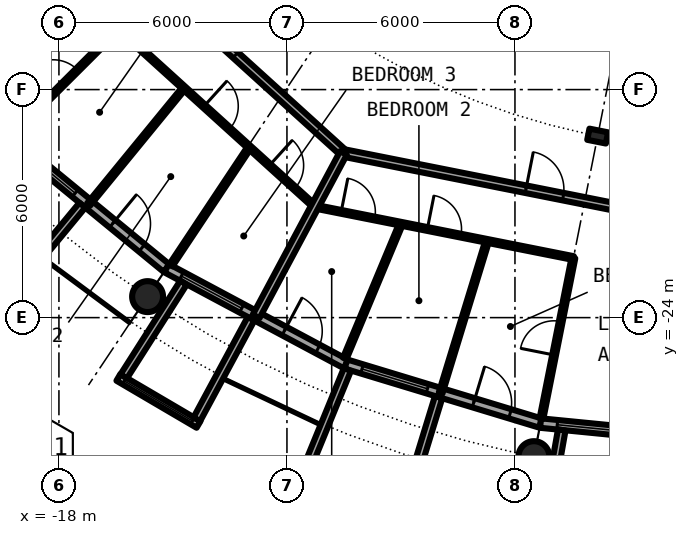
"""IFC4 building model, lengths in metres.
Left out: names, types, materials, properties, quantities, classifications, styles, units other than length and angle.
Written with IfcOpenShell. Run it as: python <this file> out.ifc"""

import sys

from ifc_helpers import new_model, si_unit, direction, frame, frame_2d, origin, origin_2d, place, context, subcontext, project, spatial, rectangle, circle, hollow_circle, i_section, extrude, element, fill, save


model = new_model("IFC4")
c1 = context("Model", 3, precision=1e-05, world=origin(), true_north=direction((0.0, 1.0)))
c2 = subcontext(c1, "Body", "Model", "MODEL_VIEW")
j1 = project(units=[si_unit("LENGTHUNIT", "METRE"), si_unit("PLANEANGLEUNIT", "RADIAN")], contexts=[c1])
p1 = place(None, origin())
s1 = spatial("IfcSite", under=j1, at=p1, CompositionType="ELEMENT")
p2 = place(p1, origin())
s2 = spatial("IfcBuilding", under=s1, at=p2, CompositionType="ELEMENT")
p3 = place(p2, frame((0.0, 0.0, 145.2)))
s3 = spatial("IfcBuildingStorey", under=s2, at=p3, CompositionType="ELEMENT", Elevation=145.2)
for number, where, z_axis, x_axis in (
    (1, (-15.667, -23.448, 0.0), (0.0, 0.0, 1.0), (1.0, 0.0, 0.0)),
    (2, (-5.501, -27.658, 0.0), (0.0, 0.0, 1.0), (1.0, 0.0, 0.0)),
):
    element("IfcColumn", number, at=place(p3, frame(where, z_axis=z_axis, x_axis=x_axis)), inside=s3, PredefinedType="COLUMN", context=c2, shape_type="SweptSolid", body=[
        extrude(hollow_circle(Radius=0.406, WallThickness=0.04, at=origin_2d()), origin(), (0.0, 0.0, 1.0), 3.05),
    ])
p4 = place(p3, frame((-3.824, -19.223, 0.0), z_axis=(0.0, 0.0, 1.0), x_axis=(-0.195090322016, -0.980785280403, 0.0)))
e3 = element("IfcColumn", 3, at=p4, inside=s3, PredefinedType="COLUMN", context=c2, shape_type="SweptSolid", body=[
    extrude(i_section(OverallWidth=0.3, OverallDepth=0.5, WebThickness=0.014, FlangeThickness=0.028, FilletRadius=0.027, at=origin_2d()), origin(), (0.0, 0.0, 1.0), 3.05),
])
p5 = place(p3, frame((-19.304, -19.304, 0.0), z_axis=(0.0, 0.0, 1.0), x_axis=(0.773019449054, -0.634382322723, 0.0)))
e4 = element("IfcWall", 4, at=p5, inside=s3, PredefinedType="SOLIDWALL", context=c2, shape_type="SweptSolid", body=[
    extrude(rectangle(XDim=5.352, YDim=0.25, at=frame_2d((2.676, 0.0))), origin(), (0.0, 0.0, 1.0), 2.7),
])
p6 = place(p5, frame((0.441, 0.0, 0.3)))
e5 = element("IfcOpeningElement", 5, at=p6, cuts=e4, PredefinedType="OPENING", context=c2, shape_type="SweptSolid", body=[
    extrude(rectangle(XDim=1.8, YDim=2.1, at=frame_2d((0.9, 1.05))), frame((0.0, 0.135, 0.0), z_axis=(0.0, -1.0, 0.0), x_axis=(1.0, 0.0, 0.0)), (0.0, 0.0, 1.0), 0.27),
])
p7 = place(p5, frame((3.51, 0.0, 0.0)))
e6 = element("IfcOpeningElement", 6, at=p7, cuts=e4, PredefinedType="OPENING", context=c2, shape_type="SweptSolid", body=[
    extrude(rectangle(XDim=1.0, YDim=2.2, at=frame_2d((0.5, 1.1))), frame((0.0, 0.135, 0.0), z_axis=(0.0, -1.0, 0.0), x_axis=(1.0, 0.0, 0.0)), (0.0, 0.0, 1.0), 0.27),
])
p8 = place(p3, frame((-17.384, -21.041, -0.03), z_axis=(0.0, 0.0, 1.0), x_axis=(-0.63709551667, -0.770784861449, 0.0)))
e7 = element("IfcWall", 7, at=p8, inside=s3, PredefinedType="SOLIDWALL", context=c2, shape_type="SweptSolid", body=[
    extrude(rectangle(XDim=3.006, YDim=0.2, at=frame_2d((1.503, 0.0))), origin(), (0.0, 0.0, 1.0), 2.73),
])
p9 = place(p3, frame((-15.167, -22.699, 0.0), z_axis=(0.0, 0.0, 1.0), x_axis=(0.881915646801, -0.471407246368, 0.0)))
e8 = element("IfcWall", 8, at=p9, inside=s3, PredefinedType="SOLIDWALL", context=c2, shape_type="SweptSolid", body=[
    extrude(rectangle(XDim=5.352, YDim=0.25, at=frame_2d((2.676, 0.0))), origin(), (0.0, 0.0, 1.0), 2.7),
])
p10 = place(p9, frame((0.441, 0.0, 0.3)))
e9 = element("IfcOpeningElement", 9, at=p10, cuts=e8, PredefinedType="OPENING", context=c2, shape_type="SweptSolid", body=[
    extrude(rectangle(XDim=1.8, YDim=2.1, at=frame_2d((0.9, 1.05))), frame((0.0, 0.135, 0.0), z_axis=(0.0, -1.0, 0.0), x_axis=(1.0, 0.0, 0.0)), (0.0, 0.0, 1.0), 0.27),
])
p11 = place(p9, frame((3.51, 0.0, 0.0)))
e10 = element("IfcOpeningElement", 10, at=p11, cuts=e8, PredefinedType="OPENING", context=c2, shape_type="SweptSolid", body=[
    extrude(rectangle(XDim=1.0, YDim=2.2, at=frame_2d((0.5, 1.1))), frame((0.0, 0.135, 0.0), z_axis=(0.0, -1.0, 0.0), x_axis=(1.0, 0.0, 0.0)), (0.0, 0.0, 1.0), 0.27),
])
p12 = place(p3, frame((-16.436, -25.574, -0.03), z_axis=(0.0, 0.0, 1.0), x_axis=(0.862403467503, -0.506221551535, 0.0)))
e11 = element("IfcWall", 11, at=p12, inside=s3, PredefinedType="SOLIDWALL", context=c2, shape_type="SweptSolid", body=[
    extrude(rectangle(XDim=2.446, YDim=0.2, at=frame_2d((1.223, 0.0))), origin(), (0.0, 0.0, 1.0), 2.73),
])
p13 = place(p12, frame((0.183, 0.0, 0.33)))
e12 = element("IfcOpeningElement", 12, at=p13, cuts=e11, PredefinedType="OPENING", context=c2, shape_type="SweptSolid", body=[
    extrude(circle(Radius=1.04, at=frame_2d((1.04, 1.04))), frame((0.0, 0.11, 0.0), z_axis=(0.0, -1.0, 0.0), x_axis=(1.0, 0.0, 0.0)), (0.0, 0.0, 1.0), 0.22),
])
p14 = place(p3, frame((-14.722, -23.079, -0.03), z_axis=(0.0, 0.0, 1.0), x_axis=(-0.537572179146, -0.843217737129, 0.0)))
e13 = element("IfcWall", 13, at=p14, inside=s3, PredefinedType="SOLIDWALL", context=c2, shape_type="SweptSolid", body=[
    extrude(rectangle(XDim=2.924, YDim=0.2, at=frame_2d((1.462, 0.0))), origin(), (0.0, 0.0, 1.0), 2.73),
])
p15 = place(p3, frame((-12.945, -24.029, -0.03), z_axis=(0.0, 0.0, 1.0), x_axis=(-0.474424310775, -0.88029629861, 0.0)))
e14 = element("IfcWall", 14, at=p15, inside=s3, PredefinedType="SOLIDWALL", context=c2, shape_type="SweptSolid", body=[
    extrude(rectangle(XDim=3.006, YDim=0.2, at=frame_2d((1.503, 0.0))), origin(), (0.0, 0.0, 1.0), 2.73),
])
p16 = place(p3, frame((-10.447, -25.222, 0.0), z_axis=(0.0, 0.0, 1.0), x_axis=(0.956965678721, -0.290201119486, 0.0)))
e15 = element("IfcWall", 15, at=p16, inside=s3, PredefinedType="SOLIDWALL", context=c2, shape_type="SweptSolid", body=[
    extrude(rectangle(XDim=5.351, YDim=0.25, at=frame_2d((2.676, 0.0))), origin(), (0.0, 0.0, 1.0), 2.7),
])
p17 = place(p16, frame((0.441, 0.0, 0.3)))
e16 = element("IfcOpeningElement", 16, at=p17, cuts=e15, PredefinedType="OPENING", context=c2, shape_type="SweptSolid", body=[
    extrude(rectangle(XDim=1.8, YDim=2.1, at=frame_2d((0.9, 1.05))), frame((0.0, 0.135, 0.0), z_axis=(0.0, -1.0, 0.0), x_axis=(1.0, 0.0, 0.0)), (0.0, 0.0, 1.0), 0.27),
])
p18 = place(p16, frame((3.51, 0.0, 0.0)))
e17 = element("IfcOpeningElement", 17, at=p18, cuts=e15, PredefinedType="OPENING", context=c2, shape_type="SweptSolid", body=[
    extrude(rectangle(XDim=1.0, YDim=2.2, at=frame_2d((0.5, 1.1))), frame((0.0, 0.135, 0.0), z_axis=(0.0, -1.0, 0.0), x_axis=(1.0, 0.0, 0.0)), (0.0, 0.0, 1.0), 0.27),
])
p19 = place(p3, frame((-10.409, -25.364, -0.03), z_axis=(0.0, 0.0, 1.0), x_axis=(-0.379509886562, -0.925187681501, 0.0)))
e18 = element("IfcWall", 18, at=p19, inside=s3, PredefinedType="SOLIDWALL", context=c2, shape_type="SweptSolid", body=[
    extrude(rectangle(XDim=2.883, YDim=0.2, at=frame_2d((1.441, 0.0))), origin(), (0.0, 0.0, 1.0), 2.73),
])
p20 = place(p3, frame((-8.009, -26.092, -0.03), z_axis=(0.0, 0.0, 1.0), x_axis=(-0.293406695073, -0.955987715029, 0.0)))
e19 = element("IfcWall", 19, at=p20, inside=s3, PredefinedType="SOLIDWALL", context=c2, shape_type="SweptSolid", body=[
    extrude(rectangle(XDim=3.006, YDim=0.2, at=frame_2d((1.503, 0.0))), origin(), (0.0, 0.0, 1.0), 2.73),
])
p21 = place(p3, frame((-5.326, -26.775, 0.0), z_axis=(0.0, 0.0, 1.0), x_axis=(0.995173996315, -0.098126026407, 0.0)))
e20 = element("IfcWall", 20, at=p21, inside=s3, PredefinedType="SOLIDWALL", context=c2, shape_type="SweptSolid", body=[
    extrude(rectangle(XDim=5.352, YDim=0.25, at=frame_2d((2.676, 0.0))), origin(), (0.0, 0.0, 1.0), 2.7),
])
p22 = place(p21, frame((0.441, 0.0, 0.3)))
e21 = element("IfcOpeningElement", 21, at=p22, cuts=e20, PredefinedType="OPENING", context=c2, shape_type="SweptSolid", body=[
    extrude(rectangle(XDim=1.8, YDim=2.1, at=frame_2d((0.9, 1.05))), frame((0.0, 0.135, 0.0), z_axis=(0.0, -1.0, 0.0), x_axis=(1.0, 0.0, 0.0)), (0.0, 0.0, 1.0), 0.27),
])
p23 = place(p21, frame((3.51, 0.0, 0.0)))
e22 = element("IfcOpeningElement", 22, at=p23, cuts=e20, PredefinedType="OPENING", context=c2, shape_type="SweptSolid", body=[
    extrude(rectangle(XDim=1.0, YDim=2.2, at=frame_2d((0.5, 1.1))), frame((0.0, 0.135, 0.0), z_axis=(0.0, -1.0, 0.0), x_axis=(1.0, 0.0, 0.0)), (0.0, 0.0, 1.0), 0.27),
])
p24 = place(p3, frame((-4.769, -26.956, -0.03), z_axis=(0.0, 0.0, 1.0), x_axis=(-0.174056778901, -0.984735618183, 0.0)))
e23 = element("IfcWall", 23, at=p24, inside=s3, PredefinedType="SOLIDWALL", context=c2, shape_type="SweptSolid", body=[
    extrude(rectangle(XDim=2.925, YDim=0.2, at=frame_2d((1.462, 0.0))), origin(), (0.0, 0.0, 1.0), 2.73),
])
p25 = place(p3, frame((-16.432, -16.396, 0.0), z_axis=(0.0, 0.0, 1.0), x_axis=(0.740901429238, -0.671613781986, 0.0)))
e24 = element("IfcWall", 24, at=p25, inside=s3, PredefinedType="PARTITIONING", context=c2, shape_type="SweptSolid", body=[
    extrude(rectangle(XDim=6.97, YDim=0.1, at=frame_2d((3.485, 0.0))), origin(), (0.0, 0.0, 1.0), 2.7),
])
p26 = place(p25, frame((3.038, 0.0, 0.0)))
e25 = element("IfcOpeningElement", 25, at=p26, cuts=e24, PredefinedType="OPENING", context=c2, shape_type="SweptSolid", body=[
    extrude(rectangle(XDim=0.9, YDim=2.3, at=frame_2d((0.45, 1.15))), frame((0.0, 0.06, 0.0), z_axis=(0.0, -1.0, 0.0), x_axis=(1.0, 0.0, 0.0)), (0.0, 0.0, 1.0), 0.12),
])
p27 = place(p25, frame((5.36, 0.0, 0.0)))
e26 = element("IfcOpeningElement", 26, at=p27, cuts=e24, PredefinedType="OPENING", context=c2, shape_type="SweptSolid", body=[
    extrude(rectangle(XDim=0.9, YDim=2.3, at=frame_2d((0.45, 1.15))), frame((0.0, 0.06, 0.0), z_axis=(0.0, -1.0, 0.0), x_axis=(1.0, 0.0, 0.0)), (0.0, 0.0, 1.0), 0.12),
])
p28 = place(p3, frame((-11.264, -21.08, 0.0), z_axis=(0.0, 0.0, 1.0), x_axis=(0.980795304313, -0.195039921651, 0.0)))
e27 = element("IfcWall", 27, at=p28, inside=s3, PredefinedType="PARTITIONING", context=c2, shape_type="SweptSolid", body=[
    extrude(rectangle(XDim=6.937, YDim=0.1, at=frame_2d((3.469, 0.0))), origin(), (0.0, 0.0, 1.0), 2.7),
])
p29 = place(p28, frame((3.016, 0.0, 0.0)))
e28 = element("IfcOpeningElement", 28, at=p29, cuts=e27, PredefinedType="OPENING", context=c2, shape_type="SweptSolid", body=[
    extrude(rectangle(XDim=0.9, YDim=2.3, at=frame_2d((0.45, 1.15))), frame((0.0, 0.06, 0.0), z_axis=(0.0, -1.0, 0.0), x_axis=(1.0, 0.0, 0.0)), (0.0, 0.0, 1.0), 0.12),
])
p30 = place(p28, frame((0.704, 0.0, 0.0)))
e29 = element("IfcOpeningElement", 29, at=p30, cuts=e27, PredefinedType="OPENING", context=c2, shape_type="SweptSolid", body=[
    extrude(rectangle(XDim=0.9, YDim=2.3, at=frame_2d((0.45, 1.15))), frame((0.0, 0.06, 0.0), z_axis=(0.0, -1.0, 0.0), x_axis=(1.0, 0.0, 0.0)), (0.0, 0.0, 1.0), 0.12),
])
p31 = place(p3, frame((-18.542, -12.389, 0.0), z_axis=(0.0, 0.0, 1.0), x_axis=(0.740947367223, -0.671563101283, 0.0)))
e30 = element("IfcWall", 30, at=p31, inside=s3, PredefinedType="PARTITIONING", context=c2, shape_type="SweptSolid", body=[
    extrude(rectangle(XDim=10.837, YDim=0.2, at=frame_2d((5.419, 0.0))), origin(), (0.0, 0.0, 1.0), 2.7),
])
p32 = place(p31, frame((6.002, 0.0, 0.0)))
e31 = element("IfcOpeningElement", 31, at=p32, cuts=e30, PredefinedType="OPENING", context=c2, shape_type="SweptSolid", body=[
    extrude(rectangle(XDim=1.0, YDim=2.3, at=frame_2d((0.5, 1.15))), frame((0.0, 0.11, 0.0), z_axis=(0.0, -1.0, 0.0), x_axis=(1.0, 0.0, 0.0)), (0.0, 0.0, 1.0), 0.22),
])
p33 = place(p3, frame((-10.512, -19.667, 0.0), z_axis=(0.0, 0.0, 1.0), x_axis=(0.980780341017, -0.195115152343, 0.0)))
e32 = element("IfcWall", 32, at=p33, inside=s3, PredefinedType="PARTITIONING", context=c2, shape_type="SweptSolid", body=[
    extrude(rectangle(XDim=12.947, YDim=0.2, at=frame_2d((6.473, 0.0))), origin(), (0.0, 0.0, 1.0), 2.7),
])
p34 = place(p33, frame((4.894, 0.0, 0.0)))
e33 = element("IfcOpeningElement", 33, at=p34, cuts=e32, PredefinedType="OPENING", context=c2, shape_type="SweptSolid", body=[
    extrude(rectangle(XDim=1.0, YDim=2.3, at=frame_2d((0.5, 1.15))), frame((0.0, 0.11, 0.0), z_axis=(0.0, -1.0, 0.0), x_axis=(1.0, 0.0, 0.0)), (0.0, 0.0, 1.0), 0.22),
])
p35 = place(p3, frame((-19.234, -19.197, 0.0), z_axis=(0.0, 0.0, 1.0), x_axis=(0.707722727509, 0.706490297858, 0.0)))
e34 = element("IfcWall", 34, at=p35, inside=s3, PredefinedType="PARTITIONING", context=c2, shape_type="SweptSolid", body=[
    extrude(rectangle(XDim=3.962, YDim=0.1, at=frame_2d((1.981, 0.0))), origin(), (0.0, 0.0, 1.0), 2.7),
])
p36 = place(p35, frame((1.531, 0.0, 0.0)))
e35 = element("IfcOpeningElement", 35, at=p36, cuts=e34, PredefinedType="OPENING", context=c2, shape_type="SweptSolid", body=[
    extrude(rectangle(XDim=0.9, YDim=2.3, at=frame_2d((0.45, 1.15))), frame((0.0, 0.06, 0.0), z_axis=(0.0, -1.0, 0.0), x_axis=(1.0, 0.0, 0.0)), (0.0, 0.0, 1.0), 0.12),
])
p37 = place(p3, frame((-17.219, -21.023, 0.0), z_axis=(0.0, 0.0, 1.0), x_axis=(0.633590098448, 0.773668913133, 0.0)))
e36 = element("IfcWall", 36, at=p37, inside=s3, PredefinedType="PARTITIONING", context=c2, shape_type="SweptSolid", body=[
    extrude(rectangle(XDim=3.962, YDim=0.1, at=frame_2d((1.981, 0.0))), origin(), (0.0, 0.0, 1.0), 2.7),
])
p38 = place(p3, frame((-15.054, -22.624, 0.0), z_axis=(0.0, 0.0, 1.0), x_axis=(0.553823887887, 0.83263383381, 0.0)))
e37 = element("IfcWall", 37, at=p38, inside=s3, PredefinedType="PARTITIONING", context=c2, shape_type="SweptSolid", body=[
    extrude(rectangle(XDim=3.73, YDim=0.1, at=frame_2d((1.865, 0.0))), origin(), (0.0, 0.0, 1.0), 2.7),
])
p39 = place(p3, frame((-12.81, -23.966, 0.0), z_axis=(0.0, 0.0, 1.0), x_axis=(0.471427642527, 0.881904744211, 0.0)))
e38 = element("IfcWall", 38, at=p39, inside=s3, PredefinedType="PARTITIONING", context=c2, shape_type="SweptSolid", body=[
    extrude(rectangle(XDim=4.875, YDim=0.2, at=frame_2d((2.438, 0.0))), origin(), (0.0, 0.0, 1.0), 2.7),
])
p40 = place(p3, frame((-10.479, -25.073, 0.0), z_axis=(0.0, 0.0, 1.0), x_axis=(0.385572005139, 0.922677749192, 0.0)))
e39 = element("IfcWall", 39, at=p40, inside=s3, PredefinedType="PARTITIONING", context=c2, shape_type="SweptSolid", body=[
    extrude(rectangle(XDim=3.841, YDim=0.1, at=frame_2d((1.92, 0.0))), origin(), (0.0, 0.0, 1.0), 2.7),
])
p41 = place(p3, frame((-7.956, -25.984, 0.0), z_axis=(0.0, 0.0, 1.0), x_axis=(0.292799128207, 0.956173975028, 0.0)))
e40 = element("IfcWall", 40, at=p41, inside=s3, PredefinedType="PARTITIONING", context=c2, shape_type="SweptSolid", body=[
    extrude(rectangle(XDim=4.188, YDim=0.1, at=frame_2d((2.094, 0.0))), origin(), (0.0, 0.0, 1.0), 2.7),
])
p42 = place(p3, frame((-5.302, -26.653, 0.0), z_axis=(0.0, 0.0, 1.0), x_axis=(0.195145394338, 0.98077432423, 0.0)))
e41 = element("IfcWall", 41, at=p42, inside=s3, PredefinedType="PARTITIONING", context=c2, shape_type="SweptSolid", body=[
    extrude(rectangle(XDim=4.305, YDim=0.1, at=frame_2d((2.152, 0.0))), origin(), (0.0, 0.0, 1.0), 2.7),
])
p43 = place(p42, frame((1.702, 0.0, 0.0)))
e42 = element("IfcOpeningElement", 42, at=p43, cuts=e41, PredefinedType="OPENING", context=c2, shape_type="SweptSolid", body=[
    extrude(rectangle(XDim=0.9, YDim=2.3, at=frame_2d((0.45, 1.15))), frame((0.0, 0.06, 0.0), z_axis=(0.0, -1.0, 0.0), x_axis=(1.0, 0.0, 0.0)), (0.0, 0.0, 1.0), 0.12),
])
p44 = place(p6, origin())
e43 = element("IfcWindow", 43, at=p44, inside=s3, PartitioningType="SINGLE_PANEL", PredefinedType="WINDOW", context=c2, shape_type="SweptSolid", body=[
    extrude(rectangle(XDim=1.8, YDim=2.1, at=frame_2d((0.9, 1.05))), frame((0.0, 0.03, 0.0), z_axis=(0.0, -1.0, 0.0), x_axis=(1.0, 0.0, 0.0)), (0.0, 0.0, 1.0), 0.06),
])
fill(e5, e43)
p45 = place(p7, origin())
e44 = element("IfcDoor", 44, at=p45, inside=s3, OperationType="SINGLE_SWING_LEFT", PredefinedType="DOOR", context=c2, shape_type="SweptSolid", body=[
    extrude(rectangle(XDim=1.0, YDim=2.2, at=frame_2d((0.5, 1.1))), frame((0.0, 0.025, 0.0), z_axis=(0.0, -1.0, 0.0), x_axis=(1.0, 0.0, 0.0)), (0.0, 0.0, 1.0), 0.05),
])
fill(e6, e44)
p46 = place(p10, origin())
e45 = element("IfcWindow", 45, at=p46, inside=s3, PartitioningType="SINGLE_PANEL", PredefinedType="WINDOW", context=c2, shape_type="SweptSolid", body=[
    extrude(rectangle(XDim=1.8, YDim=2.1, at=frame_2d((0.9, 1.05))), frame((0.0, 0.03, 0.0), z_axis=(0.0, -1.0, 0.0), x_axis=(1.0, 0.0, 0.0)), (0.0, 0.0, 1.0), 0.06),
])
fill(e9, e45)
p47 = place(p13, origin())
e46 = element("IfcWindow", 46, at=p47, inside=s3, PartitioningType="SINGLE_PANEL", PredefinedType="WINDOW", context=c2, shape_type="SweptSolid", body=[
    extrude(circle(Radius=1.04, at=frame_2d((1.04, 1.04))), frame((0.0, 0.03, 0.0), z_axis=(0.0, -1.0, 0.0), x_axis=(1.0, 0.0, 0.0)), (0.0, 0.0, 1.0), 0.06),
])
fill(e12, e46)
p48 = place(p11, origin())
e47 = element("IfcDoor", 47, at=p48, inside=s3, OperationType="SINGLE_SWING_LEFT", PredefinedType="DOOR", context=c2, shape_type="SweptSolid", body=[
    extrude(rectangle(XDim=1.0, YDim=2.2, at=frame_2d((0.5, 1.1))), frame((0.0, 0.025, 0.0), z_axis=(0.0, -1.0, 0.0), x_axis=(1.0, 0.0, 0.0)), (0.0, 0.0, 1.0), 0.05),
])
fill(e10, e47)
p49 = place(p17, origin())
e48 = element("IfcWindow", 48, at=p49, inside=s3, PartitioningType="SINGLE_PANEL", PredefinedType="WINDOW", context=c2, shape_type="SweptSolid", body=[
    extrude(rectangle(XDim=1.8, YDim=2.1, at=frame_2d((0.9, 1.05))), frame((0.0, 0.03, 0.0), z_axis=(0.0, -1.0, 0.0), x_axis=(1.0, 0.0, 0.0)), (0.0, 0.0, 1.0), 0.06),
])
fill(e16, e48)
p50 = place(p18, origin())
e49 = element("IfcDoor", 49, at=p50, inside=s3, OperationType="SINGLE_SWING_LEFT", PredefinedType="DOOR", context=c2, shape_type="SweptSolid", body=[
    extrude(rectangle(XDim=1.0, YDim=2.2, at=frame_2d((0.5, 1.1))), frame((0.0, 0.025, 0.0), z_axis=(0.0, -1.0, 0.0), x_axis=(1.0, 0.0, 0.0)), (0.0, 0.0, 1.0), 0.05),
])
fill(e17, e49)
p51 = place(p22, origin())
e50 = element("IfcWindow", 50, at=p51, inside=s3, PartitioningType="SINGLE_PANEL", PredefinedType="WINDOW", context=c2, shape_type="SweptSolid", body=[
    extrude(rectangle(XDim=1.8, YDim=2.1, at=frame_2d((0.9, 1.05))), frame((0.0, 0.03, 0.0), z_axis=(0.0, -1.0, 0.0), x_axis=(1.0, 0.0, 0.0)), (0.0, 0.0, 1.0), 0.06),
])
fill(e21, e50)
p52 = place(p32, origin())
e51 = element("IfcDoor", 51, at=p52, inside=s3, OperationType="SINGLE_SWING_RIGHT", PredefinedType="DOOR", context=c2, shape_type="SweptSolid", body=[
    extrude(rectangle(XDim=1.0, YDim=2.3, at=frame_2d((0.5, 1.15))), frame((0.0, 0.025, 0.0), z_axis=(0.0, -1.0, 0.0), x_axis=(1.0, 0.0, 0.0)), (0.0, 0.0, 1.0), 0.05),
])
fill(e31, e51)
p53 = place(p36, origin())
e52 = element("IfcDoor", 52, at=p53, inside=s3, OperationType="SINGLE_SWING_LEFT", PredefinedType="DOOR", context=c2, shape_type="SweptSolid", body=[
    extrude(rectangle(XDim=0.9, YDim=2.3, at=frame_2d((0.45, 1.15))), frame((0.0, 0.025, 0.0), z_axis=(0.0, -1.0, 0.0), x_axis=(1.0, 0.0, 0.0)), (0.0, 0.0, 1.0), 0.05),
])
fill(e35, e52)
p54 = place(p26, origin())
e53 = element("IfcDoor", 53, at=p54, inside=s3, OperationType="SINGLE_SWING_RIGHT", PredefinedType="DOOR", context=c2, shape_type="SweptSolid", body=[
    extrude(rectangle(XDim=0.9, YDim=2.3, at=frame_2d((0.45, 1.15))), frame((0.0, 0.025, 0.0), z_axis=(0.0, -1.0, 0.0), x_axis=(1.0, 0.0, 0.0)), (0.0, 0.0, 1.0), 0.05),
])
fill(e25, e53)
p55 = place(p27, origin())
e54 = element("IfcDoor", 54, at=p55, inside=s3, OperationType="SINGLE_SWING_RIGHT", PredefinedType="DOOR", context=c2, shape_type="SweptSolid", body=[
    extrude(rectangle(XDim=0.9, YDim=2.3, at=frame_2d((0.45, 1.15))), frame((0.0, 0.025, 0.0), z_axis=(0.0, -1.0, 0.0), x_axis=(1.0, 0.0, 0.0)), (0.0, 0.0, 1.0), 0.05),
])
fill(e26, e54)
p56 = place(p34, origin())
e55 = element("IfcDoor", 55, at=p56, inside=s3, OperationType="SINGLE_SWING_LEFT", PredefinedType="DOOR", context=c2, shape_type="SweptSolid", body=[
    extrude(rectangle(XDim=1.0, YDim=2.3, at=frame_2d((0.5, 1.15))), frame((0.0, 0.025, 0.0), z_axis=(0.0, -1.0, 0.0), x_axis=(1.0, 0.0, 0.0)), (0.0, 0.0, 1.0), 0.05),
])
fill(e33, e55)
p57 = place(p43, origin())
e56 = element("IfcDoor", 56, at=p57, inside=s3, OperationType="SINGLE_SWING_LEFT", PredefinedType="DOOR", context=c2, shape_type="SweptSolid", body=[
    extrude(rectangle(XDim=0.9, YDim=2.3, at=frame_2d((0.45, 1.15))), frame((0.0, 0.025, 0.0), z_axis=(0.0, -1.0, 0.0), x_axis=(1.0, 0.0, 0.0)), (0.0, 0.0, 1.0), 0.05),
])
fill(e42, e56)
p58 = place(p29, origin())
e57 = element("IfcDoor", 57, at=p58, inside=s3, OperationType="SINGLE_SWING_LEFT", PredefinedType="DOOR", context=c2, shape_type="SweptSolid", body=[
    extrude(rectangle(XDim=0.9, YDim=2.3, at=frame_2d((0.45, 1.15))), frame((0.0, 0.025, 0.0), z_axis=(0.0, -1.0, 0.0), x_axis=(1.0, 0.0, 0.0)), (0.0, 0.0, 1.0), 0.05),
])
fill(e28, e57)
p59 = place(p30, origin())
e58 = element("IfcDoor", 58, at=p59, inside=s3, OperationType="SINGLE_SWING_LEFT", PredefinedType="DOOR", context=c2, shape_type="SweptSolid", body=[
    extrude(rectangle(XDim=0.9, YDim=2.3, at=frame_2d((0.45, 1.15))), frame((0.0, 0.025, 0.0), z_axis=(0.0, -1.0, 0.0), x_axis=(1.0, 0.0, 0.0)), (0.0, 0.0, 1.0), 0.05),
])
fill(e29, e58)
save(model, sys.argv[1])
